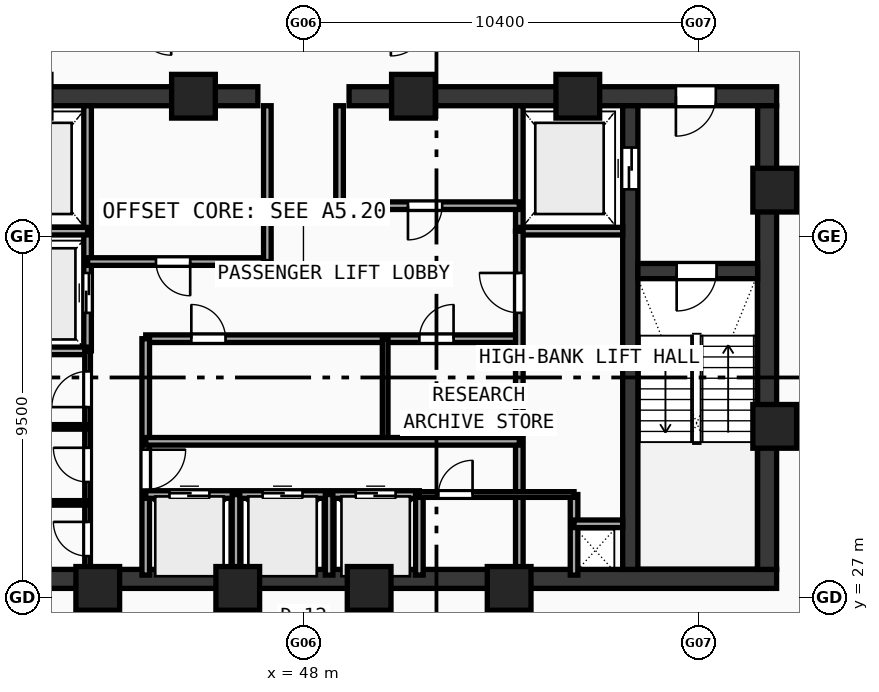
"""IFC4 building model, lengths in metres.
Left out: names, types, materials, properties, quantities, classifications, styles, units other than length and angle.
Written with IfcOpenShell. Run it as: python <this file> out.ifc"""

import sys

from ifc_helpers import new_model, si_unit, direction, frame, frame_2d, origin, origin_with_axes, origin_2d, place, context, subcontext, project, spatial, rectangle, hollow_rectangle, extrude, source, transform, mapped, element, fill, save


model = new_model("IFC4")
c1 = context("Model", 3, precision=1e-05, world=origin(), true_north=direction((0.0, 1.0)))
c2 = subcontext(c1, "Body", "Model", "MODEL_VIEW")
j1 = project(units=[si_unit("LENGTHUNIT", "METRE"), si_unit("PLANEANGLEUNIT", "RADIAN")], contexts=[c1])
p1 = place(None, origin())
s1 = spatial("IfcSite", under=j1, at=p1, CompositionType="ELEMENT")
p2 = place(p1, origin())
s2 = spatial("IfcBuilding", under=s1, at=p2, CompositionType="ELEMENT")
p3 = place(p2, frame((0.0, 0.0, 325.51)))
s3 = spatial("IfcBuildingStorey", under=s2, at=p3, CompositionType="ELEMENT", Elevation=325.51)
p4 = place(p3, frame((35.55, 27.5, 0.0), z_axis=(0.0, 0.0, 1.0), x_axis=(1.0, 0.0, 0.0)))
e1 = element("IfcWall", 1, at=p4, inside=s3, PredefinedType="SHEAR", context=c2, shape_type="SweptSolid", body=[
    extrude(rectangle(XDim=24.9, YDim=0.5, at=frame_2d((12.45, 0.0))), origin(), (0.0, 0.0, 1.0), 3.49),
])
p5 = place(p3, frame((35.55, 40.2, 0.0), z_axis=(0.0, 0.0, 1.0), x_axis=(1.0, 0.0, 0.0)))
e2 = element("IfcWall", 2, at=p5, inside=s3, PredefinedType="SHEAR", context=c2, shape_type="SweptSolid", body=[
    extrude(rectangle(XDim=11.25, YDim=0.5, at=frame_2d((5.625, 0.0))), origin(), (0.0, 0.0, 1.0), 3.49),
])
p6 = place(p5, frame((1.6, 0.0, 0.0)))
e3 = element("IfcOpeningElement", 3, at=p6, cuts=e2, PredefinedType="OPENING", context=c2, shape_type="SweptSolid", body=[
    extrude(rectangle(XDim=1.05, YDim=2.1, at=frame_2d((0.525, 1.05))), frame((0.0, 0.26, 0.0), z_axis=(0.0, -1.0, 0.0), x_axis=(1.0, 0.0, 0.0)), (0.0, 0.0, 1.0), 0.52),
])
p7 = place(p3, frame((49.2, 40.2, 0.0), z_axis=(0.0, 0.0, 1.0), x_axis=(1.0, 0.0, 0.0)))
e4 = element("IfcWall", 4, at=p7, inside=s3, PredefinedType="SHEAR", context=c2, shape_type="SweptSolid", body=[
    extrude(rectangle(XDim=11.25, YDim=0.5, at=frame_2d((5.625, 0.0))), origin(), (0.0, 0.0, 1.0), 3.49),
])
p8 = place(p7, frame((8.6, 0.0, 0.0)))
e5 = element("IfcOpeningElement", 5, at=p8, cuts=e4, PredefinedType="OPENING", context=c2, shape_type="SweptSolid", body=[
    extrude(rectangle(XDim=1.05, YDim=2.1, at=frame_2d((0.525, 1.05))), frame((0.0, 0.26, 0.0), z_axis=(0.0, -1.0, 0.0), x_axis=(1.0, 0.0, 0.0)), (0.0, 0.0, 1.0), 0.52),
])
p9 = place(p3, frame((60.2, 27.75, 0.0), z_axis=(0.0, 0.0, 1.0), x_axis=(0.0, 1.0, 0.0)))
e6 = element("IfcWall", 6, at=p9, inside=s3, PredefinedType="SHEAR", context=c2, shape_type="SweptSolid", body=[
    extrude(rectangle(XDim=12.2, YDim=0.5, at=frame_2d((6.1, 0.0))), origin(), (0.0, 0.0, 1.0), 3.49),
])
p10 = place(p3, frame((56.6, 27.75, 0.0), z_axis=(0.0, 0.0, 1.0), x_axis=(0.0, 1.0, 0.0)))
e7 = element("IfcWall", 7, at=p10, inside=s3, PredefinedType="SHEAR", context=c2, shape_type="SweptSolid", body=[
    extrude(rectangle(XDim=12.2, YDim=0.4, at=frame_2d((6.1, 0.0))), origin(), (0.0, 0.0, 1.0), 3.49),
])
p11 = place(p10, frame((10.0, 0.0, 0.0)))
e8 = element("IfcOpeningElement", 8, at=p11, cuts=e7, PredefinedType="OPENING", context=c2, shape_type="SweptSolid", body=[
    extrude(rectangle(XDim=1.1, YDim=2.1, at=frame_2d((0.55, 1.05))), frame((0.0, 0.21, 0.0), z_axis=(0.0, -1.0, 0.0), x_axis=(1.0, 0.0, 0.0)), (0.0, 0.0, 1.0), 0.42),
])
p12 = place(p3, frame((56.8, 35.6, 0.0), z_axis=(0.0, 0.0, 1.0), x_axis=(1.0, 0.0, 0.0)))
e9 = element("IfcWall", 9, at=p12, inside=s3, PredefinedType="SHEAR", context=c2, shape_type="SweptSolid", body=[
    extrude(rectangle(XDim=3.15, YDim=0.4, at=frame_2d((1.575, 0.0))), origin(), (0.0, 0.0, 1.0), 3.49),
])
p13 = place(p12, frame((1.02, 0.0, 0.0)))
e10 = element("IfcOpeningElement", 10, at=p13, cuts=e9, PredefinedType="OPENING", context=c2, shape_type="SweptSolid", body=[
    extrude(rectangle(XDim=1.05, YDim=2.1, at=frame_2d((0.525, 1.05))), frame((0.0, 0.21, 0.0), z_axis=(0.0, -1.0, 0.0), x_axis=(1.0, 0.0, 0.0)), (0.0, 0.0, 1.0), 0.42),
])
m1 = source(origin(), c2, "Body", "SweptSolid", [
    extrude(hollow_rectangle(XDim=1.15, YDim=1.15, WallThickness=0.048, at=origin_2d()), origin(), (0.0, 0.0, 1.0), 3.75),
])
for number, where, z_axis, x_axis in (
    (11, (42.588, 27.25, -0.26), (0.0, 0.0, 1.0), (1.0, 0.0, 0.0)),
    (12, (46.272, 27.25, -0.26), (0.0, 0.0, 1.0), (1.0, 0.0, 0.0)),
    (13, (49.729, 27.25, -0.26), (0.0, 0.0, 1.0), (1.0, 0.0, 0.0)),
    (14, (53.412, 27.25, -0.26), (0.0, 0.0, 1.0), (1.0, 0.0, 0.0)),
    (15, (60.4, 31.513, -0.26), (0.0, 0.0, 1.0), (1.0, 0.0, 0.0)),
    (16, (60.4, 37.729, -0.26), (0.0, 0.0, 1.0), (1.0, 0.0, 0.0)),
    (17, (55.219, 40.2, -0.26), (0.0, 0.0, 1.0), (1.0, 0.0, 0.0)),
    (18, (50.894, 40.2, -0.26), (0.0, 0.0, 1.0), (1.0, 0.0, 0.0)),
    (19, (45.106, 40.2, -0.26), (0.0, 0.0, 1.0), (1.0, 0.0, 0.0)),
):
    element("IfcColumn", number, at=place(p3, frame(where, z_axis=z_axis, x_axis=x_axis)), inside=s3, PredefinedType="COLUMN", context=c2, shape_type="MappedRepresentation", body=[
        mapped(m1, transform((0.0, 0.0, 0.0), scale=1.0)),
    ])
p14 = place(p3, frame((42.32, 33.5, 0.0), z_axis=(0.0, 0.0, 1.0), x_axis=(0.0, 1.0, 0.0)))
e20 = element("IfcWall", 20, at=p14, inside=s3, PredefinedType="SOLIDWALL", context=c2, shape_type="SweptSolid", body=[
    extrude(rectangle(XDim=6.45, YDim=0.2, at=frame_2d((3.225, 0.0))), origin(), (0.0, 0.0, 1.0), 3.49),
])
p15 = place(p14, frame((1.0, 0.0, 0.0)))
e21 = element("IfcOpeningElement", 21, at=p15, cuts=e20, PredefinedType="OPENING", context=c2, shape_type="SweptSolid", body=[
    extrude(rectangle(XDim=1.05, YDim=2.1, at=frame_2d((0.525, 1.05))), frame((0.0, 0.11, 0.0), z_axis=(0.0, -1.0, 0.0), x_axis=(1.0, 0.0, 0.0)), (0.0, 0.0, 1.0), 0.22),
])
for number, where, z_axis, x_axis in (
    (22, (39.6, 36.65, 0.0), (0.0, 0.0, 1.0), (1.0, 0.0, 0.0)),
    (23, (39.6, 33.5, 0.0), (0.0, 0.0, 1.0), (1.0, 0.0, 0.0)),
):
    element("IfcWall", number, at=place(p3, frame(where, z_axis=z_axis, x_axis=x_axis)), inside=s3, PredefinedType="SOLIDWALL", context=c2, shape_type="SweptSolid", body=[
        extrude(rectangle(XDim=2.72, YDim=0.2, at=frame_2d((1.36, 0.0))), origin(), (0.0, 0.0, 1.0), 3.49),
    ])
p16 = place(p3, frame((53.68, 36.65, 0.0), z_axis=(0.0, 0.0, 1.0), x_axis=(0.0, 1.0, 0.0)))
e24 = element("IfcWall", 24, at=p16, inside=s3, PredefinedType="SOLIDWALL", context=c2, shape_type="SweptSolid", body=[
    extrude(rectangle(XDim=3.3, YDim=0.2, at=frame_2d((1.65, 0.0))), origin(), (0.0, 0.0, 1.0), 3.49),
])
p17 = place(p3, frame((53.68, 36.65, 0.0), z_axis=(0.0, 0.0, 1.0), x_axis=(1.0, 0.0, 0.0)))
e25 = element("IfcWall", 25, at=p17, inside=s3, PredefinedType="SOLIDWALL", context=c2, shape_type="SweptSolid", body=[
    extrude(rectangle(XDim=2.72, YDim=0.2, at=frame_2d((1.36, 0.0))), origin(), (0.0, 0.0, 1.0), 3.49),
])
p18 = place(p3, frame((42.32, 35.85, 0.0), z_axis=(0.0, 0.0, 1.0), x_axis=(1.0, 0.0, 0.0)))
e26 = element("IfcWall", 26, at=p18, inside=s3, PredefinedType="SOLIDWALL", context=c2, shape_type="SweptSolid", body=[
    extrude(rectangle(XDim=4.73, YDim=0.2, at=frame_2d((2.365, 0.0))), origin(), (0.0, 0.0, 1.0), 3.49),
])
p19 = place(p18, frame((1.8, 0.0, 0.0)))
e27 = element("IfcOpeningElement", 27, at=p19, cuts=e26, PredefinedType="OPENING", context=c2, shape_type="SweptSolid", body=[
    extrude(rectangle(XDim=0.9, YDim=2.1, at=frame_2d((0.45, 1.05))), frame((0.0, 0.11, 0.0), z_axis=(0.0, -1.0, 0.0), x_axis=(1.0, 0.0, 0.0)), (0.0, 0.0, 1.0), 0.22),
])
p20 = place(p3, frame((48.95, 37.32, 0.0), z_axis=(0.0, 0.0, 1.0), x_axis=(1.0, 0.0, 0.0)))
e28 = element("IfcWall", 28, at=p20, inside=s3, PredefinedType="SOLIDWALL", context=c2, shape_type="SweptSolid", body=[
    extrude(rectangle(XDim=4.73, YDim=0.2, at=frame_2d((2.365, 0.0))), origin(), (0.0, 0.0, 1.0), 3.49),
])
p21 = place(p20, frame((1.8, 0.0, 0.0)))
e29 = element("IfcOpeningElement", 29, at=p21, cuts=e28, PredefinedType="OPENING", context=c2, shape_type="SweptSolid", body=[
    extrude(rectangle(XDim=0.9, YDim=2.1, at=frame_2d((0.45, 1.05))), frame((0.0, 0.11, 0.0), z_axis=(0.0, -1.0, 0.0), x_axis=(1.0, 0.0, 0.0)), (0.0, 0.0, 1.0), 0.22),
])
p22 = place(p3, frame((47.05, 35.85, 0.0), z_axis=(0.0, 0.0, 1.0), x_axis=(0.0, 1.0, 0.0)))
e30 = element("IfcWall", 30, at=p22, inside=s3, PredefinedType="SOLIDWALL", context=c2, shape_type="SweptSolid", body=[
    extrude(rectangle(XDim=4.1, YDim=0.2, at=frame_2d((2.05, 0.0))), origin(), (0.0, 0.0, 1.0), 3.49),
])
p23 = place(p3, frame((48.95, 37.32, 0.0), z_axis=(0.0, 0.0, 1.0), x_axis=(0.0, 1.0, 0.0)))
e31 = element("IfcWall", 31, at=p23, inside=s3, PredefinedType="SOLIDWALL", context=c2, shape_type="SweptSolid", body=[
    extrude(rectangle(XDim=2.63, YDim=0.2, at=frame_2d((1.315, 0.0))), origin(), (0.0, 0.0, 1.0), 3.49),
])
p24 = place(p3, frame((43.85, 33.82, 0.0), z_axis=(0.0, 0.0, 1.0), x_axis=(1.0, 0.0, 0.0)))
e32 = element("IfcWall", 32, at=p24, inside=s3, PredefinedType="SOLIDWALL", context=c2, shape_type="SweptSolid", body=[
    extrude(rectangle(XDim=9.83, YDim=0.2, at=frame_2d((4.915, 0.0))), origin(), (0.0, 0.0, 1.0), 3.49),
])
p25 = place(p24, frame((1.2, 0.0, 0.0)))
e33 = element("IfcOpeningElement", 33, at=p25, cuts=e32, PredefinedType="OPENING", context=c2, shape_type="SweptSolid", body=[
    extrude(rectangle(XDim=0.9, YDim=2.1, at=frame_2d((0.45, 1.05))), frame((0.0, 0.11, 0.0), z_axis=(0.0, -1.0, 0.0), x_axis=(1.0, 0.0, 0.0)), (0.0, 0.0, 1.0), 0.22),
])
p26 = place(p24, frame((7.2, 0.0, 0.0)))
e34 = element("IfcOpeningElement", 34, at=p26, cuts=e32, PredefinedType="OPENING", context=c2, shape_type="SweptSolid", body=[
    extrude(rectangle(XDim=0.9, YDim=2.1, at=frame_2d((0.45, 1.05))), frame((0.0, 0.11, 0.0), z_axis=(0.0, -1.0, 0.0), x_axis=(1.0, 0.0, 0.0)), (0.0, 0.0, 1.0), 0.22),
])
p27 = place(p3, frame((43.85, 27.6, 0.0), z_axis=(0.0, 0.0, 1.0), x_axis=(0.0, 1.0, 0.0)))
e35 = element("IfcWall", 35, at=p27, inside=s3, PredefinedType="SOLIDWALL", context=c2, shape_type="SweptSolid", body=[
    extrude(rectangle(XDim=6.22, YDim=0.2, at=frame_2d((3.11, 0.0))), origin(), (0.0, 0.0, 1.0), 3.49),
])
p28 = place(p27, frame((2.25, 0.0, 0.0)))
e36 = element("IfcOpeningElement", 36, at=p28, cuts=e35, PredefinedType="OPENING", context=c2, shape_type="SweptSolid", body=[
    extrude(rectangle(XDim=1.05, YDim=2.1, at=frame_2d((0.525, 1.05))), frame((0.0, 0.11, 0.0), z_axis=(0.0, -1.0, 0.0), x_axis=(1.0, 0.0, 0.0)), (0.0, 0.0, 1.0), 0.22),
])
p29 = place(p3, frame((53.68, 27.6, 0.0), z_axis=(0.0, 0.0, 1.0), x_axis=(0.0, 1.0, 0.0)))
e37 = element("IfcWall", 37, at=p29, inside=s3, PredefinedType="SOLIDWALL", context=c2, shape_type="SweptSolid", body=[
    extrude(rectangle(XDim=9.05, YDim=0.2, at=frame_2d((4.525, 0.0))), origin(), (0.0, 0.0, 1.0), 3.49),
])
p30 = place(p29, frame((6.9, 0.0, 0.0)))
e38 = element("IfcOpeningElement", 38, at=p30, cuts=e37, PredefinedType="OPENING", context=c2, shape_type="SweptSolid", body=[
    extrude(rectangle(XDim=1.05, YDim=2.1, at=frame_2d((0.525, 1.05))), frame((0.0, 0.11, 0.0), z_axis=(0.0, -1.0, 0.0), x_axis=(1.0, 0.0, 0.0)), (0.0, 0.0, 1.0), 0.22),
])
p31 = place(p3, frame((50.15, 31.12, 0.0), z_axis=(0.0, 0.0, 1.0), x_axis=(0.0, 1.0, 0.0)))
e39 = element("IfcWall", 39, at=p31, inside=s3, PredefinedType="PARTITIONING", context=c2, shape_type="SweptSolid", body=[
    extrude(rectangle(XDim=2.7, YDim=0.15, at=frame_2d((1.35, 0.0))), origin(), (0.0, 0.0, 1.0), 3.49),
])
p32 = place(p3, frame((43.85, 29.72, 0.0), z_axis=(0.0, 0.0, 1.0), x_axis=(1.0, 0.0, 0.0)))
e40 = element("IfcWall", 40, at=p32, inside=s3, PredefinedType="SOLIDWALL", context=c2, shape_type="SweptSolid", body=[
    extrude(rectangle(XDim=7.2, YDim=0.2, at=frame_2d((3.6, 0.0))), origin(), (0.0, 0.0, 1.0), 3.49),
])
p33 = place(p32, frame((0.625, 0.0, 0.0)))
e41 = element("IfcOpeningElement", 41, at=p33, cuts=e40, PredefinedType="OPENING", context=c2, shape_type="SweptSolid", body=[
    extrude(rectangle(XDim=1.05, YDim=2.1, at=frame_2d((0.525, 1.05))), frame((0.0, 0.11, 0.0), z_axis=(0.0, -1.0, 0.0), x_axis=(1.0, 0.0, 0.0)), (0.0, 0.0, 1.0), 0.22),
])
p34 = place(p32, frame((3.075, 0.0, 0.0)))
e42 = element("IfcOpeningElement", 42, at=p34, cuts=e40, PredefinedType="OPENING", context=c2, shape_type="SweptSolid", body=[
    extrude(rectangle(XDim=1.05, YDim=2.1, at=frame_2d((0.525, 1.05))), frame((0.0, 0.11, 0.0), z_axis=(0.0, -1.0, 0.0), x_axis=(1.0, 0.0, 0.0)), (0.0, 0.0, 1.0), 0.22),
])
p35 = place(p32, frame((5.525, 0.0, 0.0)))
e43 = element("IfcOpeningElement", 43, at=p35, cuts=e40, PredefinedType="OPENING", context=c2, shape_type="SweptSolid", body=[
    extrude(rectangle(XDim=1.05, YDim=2.1, at=frame_2d((0.525, 1.05))), frame((0.0, 0.11, 0.0), z_axis=(0.0, -1.0, 0.0), x_axis=(1.0, 0.0, 0.0)), (0.0, 0.0, 1.0), 0.22),
])
p36 = place(p3, frame((51.05, 27.6, 0.0), z_axis=(0.0, 0.0, 1.0), x_axis=(0.0, 1.0, 0.0)))
e44 = element("IfcWall", 44, at=p36, inside=s3, PredefinedType="SOLIDWALL", context=c2, shape_type="SweptSolid", body=[
    extrude(rectangle(XDim=2.12, YDim=0.2, at=frame_2d((1.06, 0.0))), origin(), (0.0, 0.0, 1.0), 3.49),
])
p37 = place(p3, frame((43.85, 31.12, 0.0), z_axis=(0.0, 0.0, 1.0), x_axis=(1.0, 0.0, 0.0)))
e45 = element("IfcWall", 45, at=p37, inside=s3, PredefinedType="SOLIDWALL", context=c2, shape_type="SweptSolid", body=[
    extrude(rectangle(XDim=9.83, YDim=0.2, at=frame_2d((4.915, 0.0))), origin(), (0.0, 0.0, 1.0), 3.49),
])
for number, where, z_axis, x_axis in (
    (46, (46.225, 27.6, 0.0), (0.0, 0.0, 1.0), (0.0, 1.0, 0.0)),
    (47, (48.675, 27.6, 0.0), (0.0, 0.0, 1.0), (0.0, 1.0, 0.0)),
    (48, (55.12, 27.6, 0.0), (0.0, 0.0, 1.0), (0.0, 1.0, 0.0)),
):
    element("IfcWall", number, at=place(p3, frame(where, z_axis=z_axis, x_axis=x_axis)), inside=s3, PredefinedType="SOLIDWALL", context=c2, shape_type="SweptSolid", body=[
        extrude(rectangle(XDim=2.12, YDim=0.2, at=frame_2d((1.06, 0.0))), origin(), (0.0, 0.0, 1.0), 3.49),
    ])
p38 = place(p3, frame((55.12, 28.95, 0.0), z_axis=(0.0, 0.0, 1.0), x_axis=(1.0, 0.0, 0.0)))
e49 = element("IfcWall", 49, at=p38, inside=s3, PredefinedType="SOLIDWALL", context=c2, shape_type="SweptSolid", body=[
    extrude(rectangle(XDim=1.28, YDim=0.2, at=frame_2d((0.64, 0.0))), origin(), (0.0, 0.0, 1.0), 3.49),
])
p39 = place(p3, frame((42.32, 27.6, 0.0), z_axis=(0.0, 0.0, 1.0), x_axis=(0.0, 1.0, 0.0)))
e50 = element("IfcWall", 50, at=p39, inside=s3, PredefinedType="PARTITIONING", context=c2, shape_type="SweptSolid", body=[
    extrude(rectangle(XDim=5.9, YDim=0.15, at=frame_2d((2.95, 0.0))), origin(), (0.0, 0.0, 1.0), 3.49),
])
p40 = place(p39, frame((0.5, 0.0, 0.0)))
e51 = element("IfcOpeningElement", 51, at=p40, cuts=e50, PredefinedType="OPENING", context=c2, shape_type="SweptSolid", body=[
    extrude(rectangle(XDim=0.9, YDim=2.1, at=frame_2d((0.45, 1.05))), frame((0.0, 0.085, 0.0), z_axis=(0.0, -1.0, 0.0), x_axis=(1.0, 0.0, 0.0)), (0.0, 0.0, 1.0), 0.17),
])
p41 = place(p39, frame((2.45, 0.0, 0.0)))
e52 = element("IfcOpeningElement", 52, at=p41, cuts=e50, PredefinedType="OPENING", context=c2, shape_type="SweptSolid", body=[
    extrude(rectangle(XDim=0.9, YDim=2.1, at=frame_2d((0.45, 1.05))), frame((0.0, 0.085, 0.0), z_axis=(0.0, -1.0, 0.0), x_axis=(1.0, 0.0, 0.0)), (0.0, 0.0, 1.0), 0.17),
])
p42 = place(p39, frame((4.42, 0.0, 0.0)))
e53 = element("IfcOpeningElement", 53, at=p42, cuts=e50, PredefinedType="OPENING", context=c2, shape_type="SweptSolid", body=[
    extrude(rectangle(XDim=0.94, YDim=2.1, at=frame_2d((0.47, 1.05))), frame((0.0, 0.085, 0.0), z_axis=(0.0, -1.0, 0.0), x_axis=(1.0, 0.0, 0.0)), (0.0, 0.0, 1.0), 0.17),
])
p43 = place(p3, frame((51.05, 29.72, 0.0), z_axis=(0.0, 0.0, 1.0), x_axis=(1.0, 0.0, 0.0)))
e54 = element("IfcWall", 54, at=p43, inside=s3, PredefinedType="PARTITIONING", context=c2, shape_type="SweptSolid", body=[
    extrude(rectangle(XDim=4.07, YDim=0.15, at=frame_2d((2.035, 0.0))), origin(), (0.0, 0.0, 1.0), 3.49),
])
p44 = place(p43, frame((0.5, 0.0, 0.0)))
e55 = element("IfcOpeningElement", 55, at=p44, cuts=e54, PredefinedType="OPENING", context=c2, shape_type="SweptSolid", body=[
    extrude(rectangle(XDim=0.9, YDim=2.1, at=frame_2d((0.45, 1.05))), frame((0.0, 0.085, 0.0), z_axis=(0.0, -1.0, 0.0), x_axis=(1.0, 0.0, 0.0)), (0.0, 0.0, 1.0), 0.17),
])
for number, where, z_axis, x_axis in (
    (56, (39.6, 29.5, 0.0), (0.0, 0.0, 1.0), (1.0, 0.0, 0.0)),
    (57, (39.6, 31.5, 0.0), (0.0, 0.0, 1.0), (1.0, 0.0, 0.0)),
):
    element("IfcWall", number, at=place(p3, frame(where, z_axis=z_axis, x_axis=x_axis)), inside=s3, PredefinedType="PARTITIONING", context=c2, shape_type="SweptSolid", body=[
        extrude(rectangle(XDim=2.72, YDim=0.12, at=frame_2d((1.36, 0.0))), origin(), (0.0, 0.0, 1.0), 3.49),
    ])
m2 = source(origin(), c2, "Body", "SweptSolid", [
    extrude(rectangle(XDim=1.05, YDim=2.1, at=frame_2d((0.525, 1.05))), frame((0.0, 0.025, 0.0), z_axis=(0.0, -1.0, 0.0), x_axis=(1.0, 0.0, 0.0)), (0.0, 0.0, 1.0), 0.05),
])
p45 = place(p13, frame((1.05, 0.0, 0.0), z_axis=(0.0, 0.0, 1.0), x_axis=(-1.0, 0.0, 0.0)))
e58 = element("IfcDoor", 58, at=p45, inside=s3, OperationType="SINGLE_SWING_RIGHT", PredefinedType="DOOR", context=c2, shape_type="MappedRepresentation", body=[
    mapped(m2, transform((0.0, 0.0, 0.0), scale=1.0)),
])
fill(e10, e58)
p46 = place(p8, frame((1.05, 0.0, 0.0), z_axis=(0.0, 0.0, 1.0), x_axis=(-1.0, 0.0, 0.0)))
e59 = element("IfcDoor", 59, at=p46, inside=s3, OperationType="SINGLE_SWING_RIGHT", PredefinedType="DOOR", context=c2, shape_type="MappedRepresentation", body=[
    mapped(m2, transform((0.0, 0.0, 0.0), scale=1.0)),
])
fill(e5, e59)
m3 = source(origin(), c2, "Body", "SweptSolid", [
    extrude(rectangle(XDim=1.1, YDim=2.1, at=frame_2d((0.55, 1.05))), frame((0.0, 0.025, 0.0), z_axis=(0.0, -1.0, 0.0), x_axis=(1.0, 0.0, 0.0)), (0.0, 0.0, 1.0), 0.05),
])
p47 = place(p11, origin_with_axes())
e60 = element("IfcDoor", 60, at=p47, inside=s3, OperationType="DOUBLE_DOOR_SLIDING", PredefinedType="DOOR", context=c2, shape_type="MappedRepresentation", body=[
    mapped(m3, transform((0.0, 0.0, 0.0), scale=1.0)),
])
fill(e8, e60)
p48 = place(p15, origin_with_axes())
e61 = element("IfcDoor", 61, at=p48, inside=s3, OperationType="DOUBLE_DOOR_SLIDING", PredefinedType="DOOR", context=c2, shape_type="MappedRepresentation", body=[
    mapped(m2, transform((0.0, 0.0, 0.0), scale=1.0)),
])
fill(e21, e61)
m4 = source(origin(), c2, "Body", "SweptSolid", [
    extrude(rectangle(XDim=0.9, YDim=2.1, at=frame_2d((0.45, 1.05))), frame((0.0, 0.025, 0.0), z_axis=(0.0, -1.0, 0.0), x_axis=(1.0, 0.0, 0.0)), (0.0, 0.0, 1.0), 0.05),
])
p49 = place(p19, frame((0.9, 0.0, 0.0), z_axis=(0.0, 0.0, 1.0), x_axis=(-1.0, 0.0, 0.0)))
e62 = element("IfcDoor", 62, at=p49, inside=s3, OperationType="SINGLE_SWING_LEFT", PredefinedType="DOOR", context=c2, shape_type="MappedRepresentation", body=[
    mapped(m4, transform((0.0, 0.0, 0.0), scale=1.0)),
])
fill(e27, e62)
p50 = place(p21, frame((0.9, 0.0, 0.0), z_axis=(0.0, 0.0, 1.0), x_axis=(-1.0, 0.0, 0.0)))
e63 = element("IfcDoor", 63, at=p50, inside=s3, OperationType="SINGLE_SWING_RIGHT", PredefinedType="DOOR", context=c2, shape_type="MappedRepresentation", body=[
    mapped(m4, transform((0.0, 0.0, 0.0), scale=1.0)),
])
fill(e29, e63)
p51 = place(p25, origin_with_axes())
e64 = element("IfcDoor", 64, at=p51, inside=s3, OperationType="SINGLE_SWING_LEFT", PredefinedType="DOOR", context=c2, shape_type="MappedRepresentation", body=[
    mapped(m4, transform((0.0, 0.0, 0.0), scale=1.0)),
])
fill(e33, e64)
p52 = place(p26, origin_with_axes())
e65 = element("IfcDoor", 65, at=p52, inside=s3, OperationType="SINGLE_SWING_RIGHT", PredefinedType="DOOR", context=c2, shape_type="MappedRepresentation", body=[
    mapped(m4, transform((0.0, 0.0, 0.0), scale=1.0)),
])
fill(e34, e65)
p53 = place(p28, frame((1.05, 0.0, 0.0), z_axis=(0.0, 0.0, 1.0), x_axis=(-1.0, 0.0, 0.0)))
e66 = element("IfcDoor", 66, at=p53, inside=s3, OperationType="SINGLE_SWING_LEFT", PredefinedType="DOOR", context=c2, shape_type="MappedRepresentation", body=[
    mapped(m2, transform((0.0, 0.0, 0.0), scale=1.0)),
])
fill(e36, e66)
p54 = place(p30, origin_with_axes())
e67 = element("IfcDoor", 67, at=p54, inside=s3, OperationType="SINGLE_SWING_RIGHT", PredefinedType="DOOR", context=c2, shape_type="MappedRepresentation", body=[
    mapped(m2, transform((0.0, 0.0, 0.0), scale=1.0)),
])
fill(e38, e67)
p55 = place(p33, origin_with_axes())
e68 = element("IfcDoor", 68, at=p55, inside=s3, OperationType="DOUBLE_DOOR_SLIDING", PredefinedType="DOOR", context=c2, shape_type="MappedRepresentation", body=[
    mapped(m2, transform((0.0, 0.0, 0.0), scale=1.0)),
])
fill(e41, e68)
p56 = place(p34, origin_with_axes())
e69 = element("IfcDoor", 69, at=p56, inside=s3, OperationType="DOUBLE_DOOR_SLIDING", PredefinedType="DOOR", context=c2, shape_type="MappedRepresentation", body=[
    mapped(m2, transform((0.0, 0.0, 0.0), scale=1.0)),
])
fill(e42, e69)
p57 = place(p35, origin_with_axes())
e70 = element("IfcDoor", 70, at=p57, inside=s3, OperationType="DOUBLE_DOOR_SLIDING", PredefinedType="DOOR", context=c2, shape_type="MappedRepresentation", body=[
    mapped(m2, transform((0.0, 0.0, 0.0), scale=1.0)),
])
fill(e43, e70)
p58 = place(p40, origin_with_axes())
e71 = element("IfcDoor", 71, at=p58, inside=s3, OperationType="SINGLE_SWING_RIGHT", PredefinedType="DOOR", context=c2, shape_type="MappedRepresentation", body=[
    mapped(m4, transform((0.0, 0.0, 0.0), scale=1.0)),
])
fill(e51, e71)
p59 = place(p41, origin_with_axes())
e72 = element("IfcDoor", 72, at=p59, inside=s3, OperationType="SINGLE_SWING_RIGHT", PredefinedType="DOOR", context=c2, shape_type="MappedRepresentation", body=[
    mapped(m4, transform((0.0, 0.0, 0.0), scale=1.0)),
])
fill(e52, e72)
m5 = source(origin(), c2, "Body", "SweptSolid", [
    extrude(rectangle(XDim=0.94, YDim=2.1, at=frame_2d((0.47, 1.05))), frame((0.0, 0.025, 0.0), z_axis=(0.0, -1.0, 0.0), x_axis=(1.0, 0.0, 0.0)), (0.0, 0.0, 1.0), 0.05),
])
p60 = place(p42, origin_with_axes())
e73 = element("IfcDoor", 73, at=p60, inside=s3, OperationType="SINGLE_SWING_LEFT", PredefinedType="DOOR", context=c2, shape_type="MappedRepresentation", body=[
    mapped(m5, transform((0.0, 0.0, 0.0), scale=1.0)),
])
fill(e53, e73)
p61 = place(p44, origin_with_axes())
e74 = element("IfcDoor", 74, at=p61, inside=s3, OperationType="SINGLE_SWING_RIGHT", PredefinedType="DOOR", context=c2, shape_type="MappedRepresentation", body=[
    mapped(m4, transform((0.0, 0.0, 0.0), scale=1.0)),
])
fill(e55, e74)
save(model, sys.argv[1])
